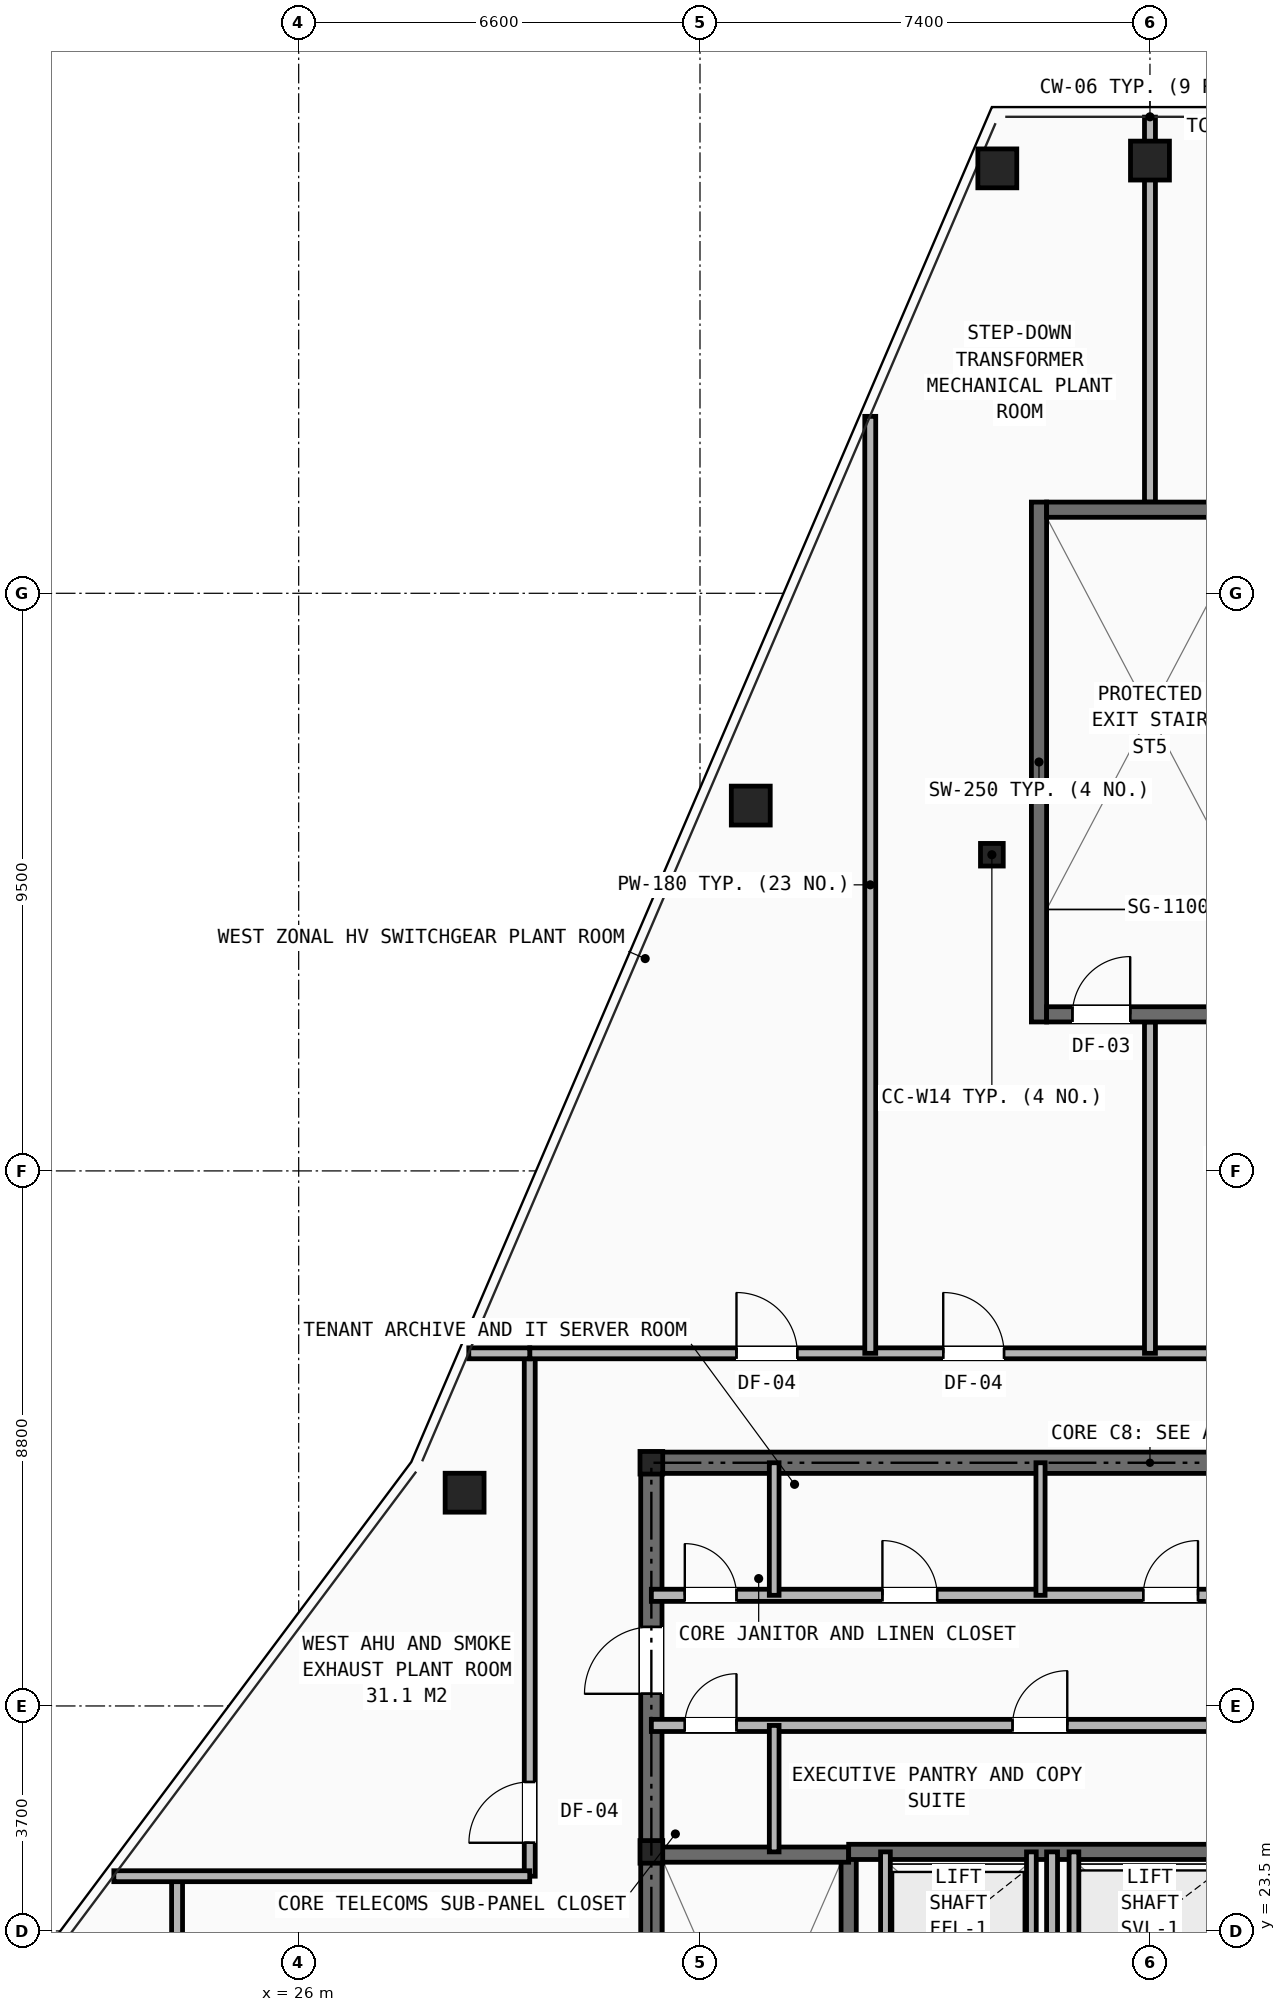
"""IFC4 building model, lengths in metres.
Left out: names, types, materials, properties, quantities, classifications, styles, units other than length and angle.
Written with IfcOpenShell. Run it as: python <this file> out.ifc"""

import sys

from ifc_helpers import new_model, si_unit, direction, frame, frame_2d, origin, origin_2d, place, context, subcontext, project, spatial, rectangle, hollow_rectangle, i_section, extrude, element, fill, save


model = new_model("IFC4")
c1 = context("Model", 3, precision=1e-05, world=origin(), true_north=direction((0.0, 1.0)))
c2 = subcontext(c1, "Body", "Model", "MODEL_VIEW")
j1 = project(units=[si_unit("LENGTHUNIT", "METRE"), si_unit("PLANEANGLEUNIT", "RADIAN")], contexts=[c1])
p1 = place(None, origin())
s1 = spatial("IfcSite", under=j1, at=p1, CompositionType="ELEMENT")
p2 = place(p1, origin())
s2 = spatial("IfcBuilding", under=s1, at=p2, CompositionType="ELEMENT")
p3 = place(p2, frame((0.0, 0.0, 290.0)))
s3 = spatial("IfcBuildingStorey", under=s2, at=p3, CompositionType="ELEMENT", Elevation=290.0)
for number, where, z_axis, x_axis in (
    (1, (31.8, 24.8, 0.0), (0.0, 0.0, 1.0), (1.0, 0.0, 0.0)),
    (2, (31.8, 31.2, 0.0), (0.0, 0.0, 1.0), (1.0, 0.0, 0.0)),
    (3, (37.4, 41.2, 0.0), (0.0, 0.0, 1.0), (1.0, 0.0, 0.0)),
):
    element("IfcColumn", number, at=place(p3, frame(where, z_axis=z_axis, x_axis=x_axis)), inside=s3, PredefinedType="COLUMN", context=c2, shape_type="SweptSolid", body=[
        extrude(i_section(OverallWidth=0.374, OverallDepth=0.372, WebThickness=0.016, FlangeThickness=0.026, at=origin_2d()), origin(), (0.0, 0.0, 1.0), 4.8),
    ])
for number, where, z_axis, x_axis in (
    (4, (40.0, 52.617, 0.0), (0.0, 0.0, 1.0), (1.0, 0.0, 0.0)),
    (5, (37.49, 52.489, 0.0), (0.0, 0.0, 1.0), (1.0, 0.0, 0.0)),
    (6, (33.435, 42.009, 0.0), (0.0, 0.0, 1.0), (1.0, 0.0, 0.0)),
    (7, (28.729, 30.708, 0.0), (0.0, 0.0, 1.0), (1.0, 0.0, 0.0)),
):
    element("IfcColumn", number, at=place(p3, frame(where, z_axis=z_axis, x_axis=x_axis)), inside=s3, PredefinedType="COLUMN", context=c2, shape_type="SweptSolid", body=[
        extrude(hollow_rectangle(XDim=0.64, YDim=0.64, WallThickness=0.045, at=origin_2d()), origin(), (0.0, 0.0, 1.0), 4.8),
    ])
p4 = place(p3, frame((31.8, 31.2, 0.0), z_axis=(0.0, 0.0, 1.0), x_axis=(1.0, 0.0, 0.0)))
e8 = element("IfcWall", 8, at=p4, inside=s3, PredefinedType="SHEAR", context=c2, shape_type="SweptSolid", body=[
    extrude(rectangle(XDim=16.4, YDim=0.35, at=frame_2d((8.2, 0.0))), origin(), (0.0, 0.0, 1.0), 4.54),
])
p5 = place(p3, frame((31.8, 16.4, 0.0), z_axis=(0.0, 0.0, 1.0), x_axis=(0.0, 1.0, 0.0)))
e9 = element("IfcWall", 9, at=p5, inside=s3, PredefinedType="SHEAR", context=c2, shape_type="SweptSolid", body=[
    extrude(rectangle(XDim=14.8, YDim=0.35, at=frame_2d((7.4, 0.0))), origin(), (0.0, 0.0, 1.0), 4.54),
])
p6 = place(p5, frame((11.0, 0.0, 0.0)))
e10 = element("IfcOpeningElement", 10, at=p6, cuts=e9, PredefinedType="OPENING", context=c2, shape_type="SweptSolid", body=[
    extrude(rectangle(XDim=1.1, YDim=2.15, at=frame_2d((0.55, 1.075))), frame((0.0, 0.185, 0.0), z_axis=(0.0, -1.0, 0.0), x_axis=(1.0, 0.0, 0.0)), (0.0, 0.0, 1.0), 0.37),
])
p7 = place(p5, frame((0.45, 0.0, 0.0)))
e11 = element("IfcOpeningElement", 11, at=p7, cuts=e9, PredefinedType="OPENING", context=c2, shape_type="SweptSolid", body=[
    extrude(rectangle(XDim=0.95, YDim=2.1, at=frame_2d((0.475, 1.05))), frame((0.0, 0.185, 0.0), z_axis=(0.0, -1.0, 0.0), x_axis=(1.0, 0.0, 0.0)), (0.0, 0.0, 1.0), 0.37),
])
p8 = place(p3, frame((35.045, 16.4, 0.0), z_axis=(0.0, 0.0, 1.0), x_axis=(0.0, 1.0, 0.0)))
e12 = element("IfcWall", 12, at=p8, inside=s3, PredefinedType="SHEAR", context=c2, shape_type="SweptSolid", body=[
    extrude(rectangle(XDim=8.4, YDim=0.25, at=frame_2d((4.2, 0.0))), origin(), (0.0, 0.0, 1.0), 4.54),
])
p9 = place(p8, frame((0.45, 0.0, 0.0)))
e13 = element("IfcOpeningElement", 13, at=p9, cuts=e12, PredefinedType="OPENING", context=c2, shape_type="SweptSolid", body=[
    extrude(rectangle(XDim=0.95, YDim=2.1, at=frame_2d((0.475, 1.05))), frame((0.0, 0.135, 0.0), z_axis=(0.0, -1.0, 0.0), x_axis=(1.0, 0.0, 0.0)), (0.0, 0.0, 1.0), 0.27),
])
p10 = place(p3, frame((31.8, 24.755, 0.0), z_axis=(0.0, 0.0, 1.0), x_axis=(1.0, 0.0, 0.0)))
e14 = element("IfcWall", 14, at=p10, inside=s3, PredefinedType="SHEAR", context=c2, shape_type="SweptSolid", body=[
    extrude(rectangle(XDim=3.245, YDim=0.25, at=frame_2d((1.623, 0.0))), origin(), (0.0, 0.0, 1.0), 4.54),
])
p11 = place(p3, frame((35.045, 24.8, 0.0), z_axis=(0.0, 0.0, 1.0), x_axis=(1.0, 0.0, 0.0)))
e15 = element("IfcWall", 15, at=p11, inside=s3, PredefinedType="SHEAR", context=c2, shape_type="SweptSolid", body=[
    extrude(rectangle(XDim=9.91, YDim=0.25, at=frame_2d((4.955, 0.0))), origin(), (0.0, 0.0, 1.0), 4.54),
])
p12 = place(p3, frame((38.39, 16.4, 0.0), z_axis=(0.0, 0.0, 1.0), x_axis=(0.0, 1.0, 0.0)))
e16 = element("IfcWall", 16, at=p12, inside=s3, PredefinedType="PARTITIONING", context=c2, shape_type="SweptSolid", body=[
    extrude(rectangle(XDim=8.4, YDim=0.18, at=frame_2d((4.2, 0.0))), origin(), (0.0, 0.0, 1.0), 3.995),
])
p13 = place(p12, frame((3.8, 0.0, 0.0)))
e17 = element("IfcOpeningElement", 17, at=p13, cuts=e16, PredefinedType="OPENING", context=c2, shape_type="SweptSolid", body=[
    extrude(rectangle(XDim=0.95, YDim=2.1, at=frame_2d((0.475, 1.05))), frame((0.0, 0.1, 0.0), z_axis=(0.0, -1.0, 0.0), x_axis=(1.0, 0.0, 0.0)), (0.0, 0.0, 1.0), 0.2),
])
for number, where, z_axis, x_axis in (
    (18, (35.65, 22.48, 0.0), (0.0, 0.0, 1.0), (0.0, 1.0, 0.0)),
    (19, (38.05, 22.48, 0.0), (0.0, 0.0, 1.0), (0.0, 1.0, 0.0)),
    (20, (38.75, 22.48, 0.0), (0.0, 0.0, 1.0), (0.0, 1.0, 0.0)),
):
    element("IfcWall", number, at=place(p3, frame(where, z_axis=z_axis, x_axis=x_axis)), inside=s3, PredefinedType="SOLIDWALL", context=c2, shape_type="SweptSolid", body=[
        extrude(rectangle(XDim=2.32, YDim=0.16, at=frame_2d((1.16, 0.0))), origin(), (0.0, 0.0, 1.0), 4.54),
    ])
p14 = place(p3, frame((31.8, 29.02, 0.0), z_axis=(0.0, 0.0, 1.0), x_axis=(1.0, 0.0, 0.0)))
e21 = element("IfcWall", 21, at=p14, inside=s3, PredefinedType="SOLIDWALL", context=c2, shape_type="SweptSolid", body=[
    extrude(rectangle(XDim=16.4, YDim=0.2, at=frame_2d((8.2, 0.0))), origin(), (0.0, 0.0, 1.0), 3.995),
])
p15 = place(p14, frame((0.55, 0.0, 0.0)))
e22 = element("IfcOpeningElement", 22, at=p15, cuts=e21, PredefinedType="OPENING", context=c2, shape_type="SweptSolid", body=[
    extrude(rectangle(XDim=0.85, YDim=2.05, at=frame_2d((0.425, 1.025))), frame((0.0, 0.11, 0.0), z_axis=(0.0, -1.0, 0.0), x_axis=(1.0, 0.0, 0.0)), (0.0, 0.0, 1.0), 0.22),
])
p16 = place(p14, frame((3.8, 0.0, 0.0)))
e23 = element("IfcOpeningElement", 23, at=p16, cuts=e21, PredefinedType="OPENING", context=c2, shape_type="SweptSolid", body=[
    extrude(rectangle(XDim=0.9, YDim=2.1, at=frame_2d((0.45, 1.05))), frame((0.0, 0.11, 0.0), z_axis=(0.0, -1.0, 0.0), x_axis=(1.0, 0.0, 0.0)), (0.0, 0.0, 1.0), 0.22),
])
p17 = place(p14, frame((8.09, 0.0, 0.0)))
e24 = element("IfcOpeningElement", 24, at=p17, cuts=e21, PredefinedType="OPENING", context=c2, shape_type="SweptSolid", body=[
    extrude(rectangle(XDim=0.9, YDim=2.1, at=frame_2d((0.45, 1.05))), frame((0.0, 0.11, 0.0), z_axis=(0.0, -1.0, 0.0), x_axis=(1.0, 0.0, 0.0)), (0.0, 0.0, 1.0), 0.22),
])
p18 = place(p3, frame((31.8, 26.88, 0.0), z_axis=(0.0, 0.0, 1.0), x_axis=(1.0, 0.0, 0.0)))
e25 = element("IfcWall", 25, at=p18, inside=s3, PredefinedType="SOLIDWALL", context=c2, shape_type="SweptSolid", body=[
    extrude(rectangle(XDim=16.4, YDim=0.2, at=frame_2d((8.2, 0.0))), origin(), (0.0, 0.0, 1.0), 3.995),
])
p19 = place(p18, frame((0.55, 0.0, 0.0)))
e26 = element("IfcOpeningElement", 26, at=p19, cuts=e25, PredefinedType="OPENING", context=c2, shape_type="SweptSolid", body=[
    extrude(rectangle(XDim=0.85, YDim=2.05, at=frame_2d((0.425, 1.025))), frame((0.0, 0.11, 0.0), z_axis=(0.0, -1.0, 0.0), x_axis=(1.0, 0.0, 0.0)), (0.0, 0.0, 1.0), 0.22),
])
p20 = place(p18, frame((5.94, 0.0, 0.0)))
e27 = element("IfcOpeningElement", 27, at=p20, cuts=e25, PredefinedType="OPENING", context=c2, shape_type="SweptSolid", body=[
    extrude(rectangle(XDim=0.9, YDim=2.1, at=frame_2d((0.45, 1.05))), frame((0.0, 0.11, 0.0), z_axis=(0.0, -1.0, 0.0), x_axis=(1.0, 0.0, 0.0)), (0.0, 0.0, 1.0), 0.22),
])
p21 = place(p3, frame((33.82, 29.02, 0.0), z_axis=(0.0, 0.0, 1.0), x_axis=(0.0, 1.0, 0.0)))
e28 = element("IfcWall", 28, at=p21, inside=s3, PredefinedType="SOLIDWALL", context=c2, shape_type="SweptSolid", body=[
    extrude(rectangle(XDim=2.18, YDim=0.16, at=frame_2d((1.09, 0.0))), origin(), (0.0, 0.0, 1.0), 3.995),
])
p22 = place(p3, frame((33.82, 24.8, 0.0), z_axis=(0.0, 0.0, 1.0), x_axis=(0.0, 1.0, 0.0)))
e29 = element("IfcWall", 29, at=p22, inside=s3, PredefinedType="SOLIDWALL", context=c2, shape_type="SweptSolid", body=[
    extrude(rectangle(XDim=2.08, YDim=0.16, at=frame_2d((1.04, 0.0))), origin(), (0.0, 0.0, 1.0), 4.54),
])
p23 = place(p3, frame((38.2, 29.02, 0.0), z_axis=(0.0, 0.0, 1.0), x_axis=(0.0, 1.0, 0.0)))
e30 = element("IfcWall", 30, at=p23, inside=s3, PredefinedType="PARTITIONING", context=c2, shape_type="SweptSolid", body=[
    extrude(rectangle(XDim=2.18, YDim=0.15, at=frame_2d((1.09, 0.0))), origin(), (0.0, 0.0, 1.0), 3.995),
])
p24 = place(p3, frame((24.0, 14.2, 0.0), z_axis=(0.0, 0.0, 1.0), x_axis=(0.0, 1.0, 0.0)))
e31 = element("IfcWall", 31, at=p24, inside=s3, PredefinedType="PARTITIONING", context=c2, shape_type="SweptSolid", body=[
    extrude(rectangle(XDim=10.2, YDim=0.18, at=frame_2d((5.1, 0.0))), origin(), (0.0, 0.0, 1.0), 3.918),
])
p25 = place(p3, frame((29.8, 24.4, 0.0), z_axis=(0.0, 0.0, 1.0), x_axis=(0.0, 1.0, 0.0)))
e32 = element("IfcWall", 32, at=p25, inside=s3, PredefinedType="PARTITIONING", context=c2, shape_type="SweptSolid", body=[
    extrude(rectangle(XDim=8.6, YDim=0.18, at=frame_2d((4.3, 0.0))), origin(), (0.0, 0.0, 1.0), 3.582),
])
p26 = place(p25, frame((0.55, 0.0, 0.0)))
e33 = element("IfcOpeningElement", 33, at=p26, cuts=e32, PredefinedType="OPENING", context=c2, shape_type="SweptSolid", body=[
    extrude(rectangle(XDim=1.0, YDim=2.15, at=frame_2d((0.5, 1.075))), frame((0.0, 0.1, 0.0), z_axis=(0.0, -1.0, 0.0), x_axis=(1.0, 0.0, 0.0)), (0.0, 0.0, 1.0), 0.2),
])
p27 = place(p3, frame((29.8, 33.0, 0.0), z_axis=(0.0, 0.0, 1.0), x_axis=(1.0, 0.0, 0.0)))
e34 = element("IfcWall", 34, at=p27, inside=s3, PredefinedType="PARTITIONING", context=c2, shape_type="SweptSolid", body=[
    extrude(rectangle(XDim=20.4, YDim=0.18, at=frame_2d((10.2, 0.0))), origin(), (0.0, 0.0, 1.0), 3.918),
])
p28 = place(p27, frame((3.4, 0.0, 0.0)))
e35 = element("IfcOpeningElement", 35, at=p28, cuts=e34, PredefinedType="OPENING", context=c2, shape_type="SweptSolid", body=[
    extrude(rectangle(XDim=1.0, YDim=2.15, at=frame_2d((0.5, 1.075))), frame((0.0, 0.1, 0.0), z_axis=(0.0, -1.0, 0.0), x_axis=(1.0, 0.0, 0.0)), (0.0, 0.0, 1.0), 0.2),
])
p29 = place(p27, frame((6.8, 0.0, 0.0)))
e36 = element("IfcOpeningElement", 36, at=p29, cuts=e34, PredefinedType="OPENING", context=c2, shape_type="SweptSolid", body=[
    extrude(rectangle(XDim=1.0, YDim=2.15, at=frame_2d((0.5, 1.075))), frame((0.0, 0.1, 0.0), z_axis=(0.0, -1.0, 0.0), x_axis=(1.0, 0.0, 0.0)), (0.0, 0.0, 1.0), 0.2),
])
p30 = place(p27, frame((11.4, 0.0, 0.0)))
e37 = element("IfcOpeningElement", 37, at=p30, cuts=e34, PredefinedType="OPENING", context=c2, shape_type="SweptSolid", body=[
    extrude(rectangle(XDim=1.0, YDim=2.15, at=frame_2d((0.5, 1.075))), frame((0.0, 0.1, 0.0), z_axis=(0.0, -1.0, 0.0), x_axis=(1.0, 0.0, 0.0)), (0.0, 0.0, 1.0), 0.2),
])
p31 = place(p27, frame((16.0, 0.0, 0.0)))
e38 = element("IfcOpeningElement", 38, at=p31, cuts=e34, PredefinedType="OPENING", context=c2, shape_type="SweptSolid", body=[
    extrude(rectangle(XDim=1.0, YDim=2.15, at=frame_2d((0.5, 1.075))), frame((0.0, 0.1, 0.0), z_axis=(0.0, -1.0, 0.0), x_axis=(1.0, 0.0, 0.0)), (0.0, 0.0, 1.0), 0.2),
])
p32 = place(p3, frame((22.96, 24.4, 0.0), z_axis=(0.0, 0.0, 1.0), x_axis=(1.0, 0.0, 0.0)))
e39 = element("IfcWall", 39, at=p32, inside=s3, PredefinedType="PARTITIONING", context=c2, shape_type="SweptSolid", body=[
    extrude(rectangle(XDim=6.84, YDim=0.18, at=frame_2d((3.42, 0.0))), origin(), (0.0, 0.0, 1.0), 3.918),
])
p33 = place(p3, frame((28.797, 33.0, 0.0), z_axis=(0.0, 0.0, 1.0), x_axis=(1.0, 0.0, 0.0)))
e40 = element("IfcWall", 40, at=p33, inside=s3, PredefinedType="PARTITIONING", context=c2, shape_type="SweptSolid", body=[
    extrude(rectangle(XDim=1.003, YDim=0.18, at=frame_2d((0.501, 0.0))), origin(), (0.0, 0.0, 1.0), 3.918),
])
p34 = place(p3, frame((35.4, 33.0, 0.0), z_axis=(0.0, 0.0, 1.0), x_axis=(0.0, 1.0, 0.0)))
e41 = element("IfcWall", 41, at=p34, inside=s3, PredefinedType="PARTITIONING", context=c2, shape_type="SweptSolid", body=[
    extrude(rectangle(XDim=15.41, YDim=0.18, at=frame_2d((7.705, 0.0))), origin(), (0.0, 0.0, 1.0), 3.582),
])
p35 = place(p3, frame((40.0, 33.0, 0.0), z_axis=(0.0, 0.0, 1.0), x_axis=(0.0, 1.0, 0.0)))
e42 = element("IfcWall", 42, at=p35, inside=s3, PredefinedType="PARTITIONING", context=c2, shape_type="SweptSolid", body=[
    extrude(rectangle(XDim=5.45, YDim=0.18, at=frame_2d((2.725, 0.0))), origin(), (0.0, 0.0, 1.0), 4.54),
])
p36 = place(p3, frame((40.0, 47.0, 0.0), z_axis=(0.0, 0.0, 1.0), x_axis=(0.0, 1.0, 0.0)))
e43 = element("IfcWall", 43, at=p36, inside=s3, PredefinedType="PARTITIONING", context=c2, shape_type="SweptSolid", body=[
    extrude(rectangle(XDim=6.332, YDim=0.18, at=frame_2d((3.166, 0.0))), origin(), (0.0, 0.0, 1.0), 3.582),
])
p37 = place(p3, frame((38.175, 38.45, 0.0), z_axis=(0.0, 0.0, 1.0), x_axis=(0.0, 1.0, 0.0)))
e44 = element("IfcWall", 44, at=p37, inside=s3, PredefinedType="SHEAR", context=c2, shape_type="SweptSolid", body=[
    extrude(rectangle(XDim=8.55, YDim=0.25, at=frame_2d((4.275, 0.0))), origin(), (0.0, 0.0, 1.0), 4.54),
])
p38 = place(p3, frame((38.3, 38.575, 0.0), z_axis=(0.0, 0.0, 1.0), x_axis=(1.0, 0.0, 0.0)))
e45 = element("IfcWall", 45, at=p38, inside=s3, PredefinedType="SHEAR", context=c2, shape_type="SweptSolid", body=[
    extrude(rectangle(XDim=3.4, YDim=0.25, at=frame_2d((1.7, 0.0))), origin(), (0.0, 0.0, 1.0), 4.54),
])
p39 = place(p38, frame((0.425, 0.0, 0.0)))
e46 = element("IfcOpeningElement", 46, at=p39, cuts=e45, PredefinedType="OPENING", context=c2, shape_type="SweptSolid", body=[
    extrude(rectangle(XDim=0.95, YDim=2.1, at=frame_2d((0.475, 1.05))), frame((0.0, 0.135, 0.0), z_axis=(0.0, -1.0, 0.0), x_axis=(1.0, 0.0, 0.0)), (0.0, 0.0, 1.0), 0.27),
])
p40 = place(p3, frame((38.3, 46.875, 0.0), z_axis=(0.0, 0.0, 1.0), x_axis=(1.0, 0.0, 0.0)))
e47 = element("IfcWall", 47, at=p40, inside=s3, PredefinedType="SHEAR", context=c2, shape_type="SweptSolid", body=[
    extrude(rectangle(XDim=3.4, YDim=0.25, at=frame_2d((1.7, 0.0))), origin(), (0.0, 0.0, 1.0), 4.54),
])
p41 = place(p15, origin())
e48 = element("IfcDoor", 48, at=p41, inside=s3, OperationType="SINGLE_SWING_LEFT", PredefinedType="DOOR", context=c2, shape_type="SweptSolid", body=[
    extrude(rectangle(XDim=0.85, YDim=2.05, at=frame_2d((0.425, 1.025))), frame((0.0, 0.025, 0.0), z_axis=(0.0, -1.0, 0.0), x_axis=(1.0, 0.0, 0.0)), (0.0, 0.0, 1.0), 0.05),
])
fill(e22, e48)
p42 = place(p19, origin())
e49 = element("IfcDoor", 49, at=p42, inside=s3, OperationType="SINGLE_SWING_RIGHT", PredefinedType="DOOR", context=c2, shape_type="SweptSolid", body=[
    extrude(rectangle(XDim=0.85, YDim=2.05, at=frame_2d((0.425, 1.025))), frame((0.0, 0.025, 0.0), z_axis=(0.0, -1.0, 0.0), x_axis=(1.0, 0.0, 0.0)), (0.0, 0.0, 1.0), 0.05),
])
fill(e26, e49)
p43 = place(p6, origin())
e50 = element("IfcDoor", 50, at=p43, inside=s3, OperationType="SINGLE_SWING_LEFT", PredefinedType="DOOR", context=c2, shape_type="SweptSolid", body=[
    extrude(rectangle(XDim=1.1, YDim=2.15, at=frame_2d((0.55, 1.075))), frame((0.0, 0.025, 0.0), z_axis=(0.0, -1.0, 0.0), x_axis=(1.0, 0.0, 0.0)), (0.0, 0.0, 1.0), 0.05),
])
fill(e10, e50)
p44 = place(p16, origin())
e51 = element("IfcDoor", 51, at=p44, inside=s3, OperationType="SINGLE_SWING_LEFT", PredefinedType="DOOR", context=c2, shape_type="SweptSolid", body=[
    extrude(rectangle(XDim=0.9, YDim=2.1, at=frame_2d((0.45, 1.05))), frame((0.0, 0.025, 0.0), z_axis=(0.0, -1.0, 0.0), x_axis=(1.0, 0.0, 0.0)), (0.0, 0.0, 1.0), 0.05),
])
fill(e23, e51)
p45 = place(p17, origin())
e52 = element("IfcDoor", 52, at=p45, inside=s3, OperationType="SINGLE_SWING_RIGHT", PredefinedType="DOOR", context=c2, shape_type="SweptSolid", body=[
    extrude(rectangle(XDim=0.9, YDim=2.1, at=frame_2d((0.45, 1.05))), frame((0.0, 0.025, 0.0), z_axis=(0.0, -1.0, 0.0), x_axis=(1.0, 0.0, 0.0)), (0.0, 0.0, 1.0), 0.05),
])
fill(e24, e52)
p46 = place(p20, origin())
e53 = element("IfcDoor", 53, at=p46, inside=s3, OperationType="SINGLE_SWING_RIGHT", PredefinedType="DOOR", context=c2, shape_type="SweptSolid", body=[
    extrude(rectangle(XDim=0.9, YDim=2.1, at=frame_2d((0.45, 1.05))), frame((0.0, 0.025, 0.0), z_axis=(0.0, -1.0, 0.0), x_axis=(1.0, 0.0, 0.0)), (0.0, 0.0, 1.0), 0.05),
])
fill(e27, e53)
p47 = place(p26, origin())
e54 = element("IfcDoor", 54, at=p47, inside=s3, OperationType="SINGLE_SWING_LEFT", PredefinedType="DOOR", context=c2, shape_type="SweptSolid", body=[
    extrude(rectangle(XDim=1.0, YDim=2.15, at=frame_2d((0.5, 1.075))), frame((0.0, 0.025, 0.0), z_axis=(0.0, -1.0, 0.0), x_axis=(1.0, 0.0, 0.0)), (0.0, 0.0, 1.0), 0.05),
])
fill(e33, e54)
p48 = place(p28, origin())
e55 = element("IfcDoor", 55, at=p48, inside=s3, OperationType="SINGLE_SWING_LEFT", PredefinedType="DOOR", context=c2, shape_type="SweptSolid", body=[
    extrude(rectangle(XDim=1.0, YDim=2.15, at=frame_2d((0.5, 1.075))), frame((0.0, 0.025, 0.0), z_axis=(0.0, -1.0, 0.0), x_axis=(1.0, 0.0, 0.0)), (0.0, 0.0, 1.0), 0.05),
])
fill(e35, e55)
p49 = place(p29, origin())
e56 = element("IfcDoor", 56, at=p49, inside=s3, OperationType="SINGLE_SWING_LEFT", PredefinedType="DOOR", context=c2, shape_type="SweptSolid", body=[
    extrude(rectangle(XDim=1.0, YDim=2.15, at=frame_2d((0.5, 1.075))), frame((0.0, 0.025, 0.0), z_axis=(0.0, -1.0, 0.0), x_axis=(1.0, 0.0, 0.0)), (0.0, 0.0, 1.0), 0.05),
])
fill(e36, e56)
p50 = place(p39, origin())
e57 = element("IfcDoor", 57, at=p50, inside=s3, OperationType="SINGLE_SWING_RIGHT", PredefinedType="DOOR", context=c2, shape_type="SweptSolid", body=[
    extrude(rectangle(XDim=0.95, YDim=2.1, at=frame_2d((0.475, 1.05))), frame((0.0, 0.025, 0.0), z_axis=(0.0, -1.0, 0.0), x_axis=(1.0, 0.0, 0.0)), (0.0, 0.0, 1.0), 0.05),
])
fill(e46, e57)
save(model, sys.argv[1])
